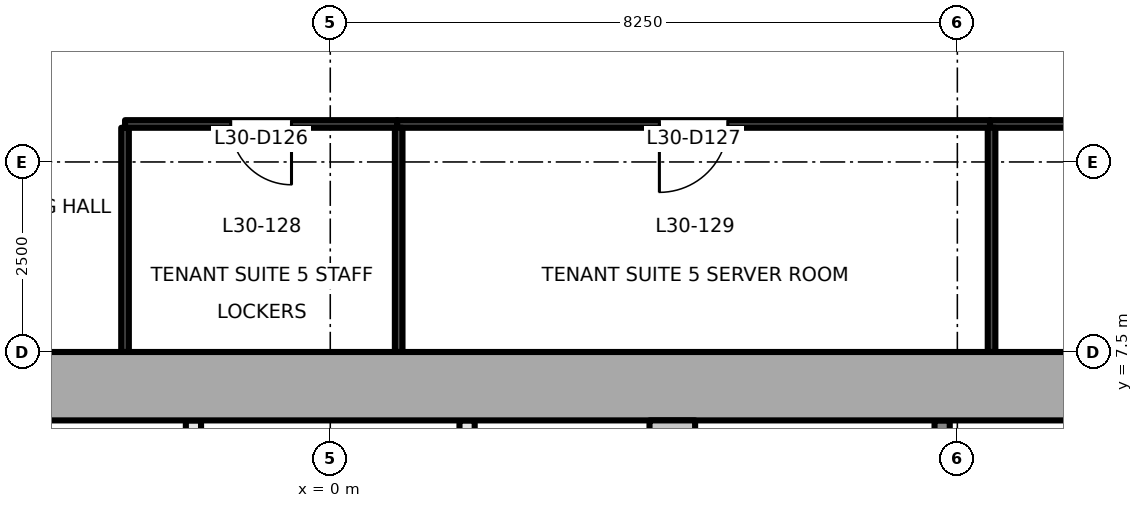
"""IFC4 building model, lengths in metres.
Left out: names, types, materials, properties, quantities, classifications, styles, units other than length and angle.
Written with IfcOpenShell. Run it as: python <this file> out.ifc"""

import sys

from ifc_helpers import new_model, si_unit, direction, frame, frame_2d, origin, place, context, subcontext, project, spatial, rectangle, extrude, element, fill, save


model = new_model("IFC4")
c1 = context("Model", 3, precision=1e-05, world=origin(), true_north=direction((0.0, 1.0)))
c2 = subcontext(c1, "Body", "Model", "MODEL_VIEW")
j1 = project(units=[si_unit("LENGTHUNIT", "METRE"), si_unit("PLANEANGLEUNIT", "RADIAN")], contexts=[c1])
p1 = place(None, origin())
s1 = spatial("IfcSite", under=j1, at=p1, CompositionType="ELEMENT")
p2 = place(p1, origin())
s2 = spatial("IfcBuilding", under=s1, at=p2, CompositionType="ELEMENT")
p3 = place(p2, frame((0.0, 0.0, 134.1)))
s3 = spatial("IfcBuildingStorey", under=s2, at=p3, CompositionType="ELEMENT", Elevation=134.1)
p4 = place(p3, frame((-18.0, 7.05, -0.2), z_axis=(0.0, 0.0, 1.0), x_axis=(1.0, 0.0, 0.0)))
e1 = element("IfcWall", 1, at=p4, inside=s3, PredefinedType="SHEAR", context=c2, shape_type="SweptSolid", body=[
    extrude(rectangle(XDim=36.0, YDim=0.9, at=frame_2d((18.0, 0.0))), origin(), (0.0, 0.0, 1.0), 4.0),
])
p5 = place(p3, frame((4.5, -6.6, -0.2), z_axis=(0.0, 0.0, 1.0), x_axis=(0.0, 1.0, 0.0)))
e2 = element("IfcWall", 2, at=p5, inside=s3, PredefinedType="SHEAR", context=c2, shape_type="SweptSolid", body=[
    extrude(rectangle(XDim=13.2, YDim=0.6, at=frame_2d((6.6, 0.0))), origin(), (0.0, 0.0, 1.0), 4.0),
])
p6 = place(p3, frame((-1.8, -6.6, 0.0), z_axis=(0.0, 0.0, 1.0), x_axis=(0.0, 1.0, 0.0)))
e3 = element("IfcWall", 3, at=p6, inside=s3, PredefinedType="PARTITIONING", context=c2, shape_type="SweptSolid", body=[
    extrude(rectangle(XDim=13.2, YDim=0.2, at=frame_2d((6.6, 0.0))), origin(), (0.0, 0.0, 1.0), 3.8),
])
p7 = place(p6, frame((0.55, 0.0, 0.0)))
e4 = element("IfcOpeningElement", 4, at=p7, cuts=e3, PredefinedType="OPENING", context=c2, shape_type="SweptSolid", body=[
    extrude(rectangle(XDim=0.9, YDim=2.1, at=frame_2d((0.45, 1.05))), frame((0.0, 0.111, 0.0), z_axis=(0.0, -1.0, 0.0), x_axis=(1.0, 0.0, 0.0)), (0.0, 0.0, 1.0), 0.221),
])
p8 = place(p3, frame((1.8, -6.6, 0.0), z_axis=(0.0, 0.0, 1.0), x_axis=(0.0, 1.0, 0.0)))
e5 = element("IfcWall", 5, at=p8, inside=s3, PredefinedType="PARTITIONING", context=c2, shape_type="SweptSolid", body=[
    extrude(rectangle(XDim=13.2, YDim=0.2, at=frame_2d((6.6, 0.0))), origin(), (0.0, 0.0, 1.0), 3.8),
])
p9 = place(p8, frame((0.55, 0.0, 0.0)))
e6 = element("IfcOpeningElement", 6, at=p9, cuts=e5, PredefinedType="OPENING", context=c2, shape_type="SweptSolid", body=[
    extrude(rectangle(XDim=0.9, YDim=2.1, at=frame_2d((0.45, 1.05))), frame((0.0, 0.111, 0.0), z_axis=(0.0, -1.0, 0.0), x_axis=(1.0, 0.0, 0.0)), (0.0, 0.0, 1.0), 0.221),
])
p10 = place(p3, frame((8.05, -6.6, 0.0), z_axis=(0.0, 0.0, 1.0), x_axis=(0.0, 1.0, 0.0)))
e7 = element("IfcWall", 7, at=p10, inside=s3, PredefinedType="PARTITIONING", context=c2, shape_type="SweptSolid", body=[
    extrude(rectangle(XDim=13.2, YDim=0.2, at=frame_2d((6.6, 0.0))), origin(), (0.0, 0.0, 1.0), 3.8),
])
p11 = place(p10, frame((0.298, 0.0, 0.0)))
e8 = element("IfcOpeningElement", 8, at=p11, cuts=e7, PredefinedType="OPENING", context=c2, shape_type="SweptSolid", body=[
    extrude(rectangle(XDim=0.9, YDim=2.1, at=frame_2d((0.45, 1.05))), frame((0.0, 0.111, 0.0), z_axis=(0.0, -1.0, 0.0), x_axis=(1.0, 0.0, 0.0)), (0.0, 0.0, 1.0), 0.221),
])
p12 = place(p10, frame((2.066, 0.0, 0.0)))
e9 = element("IfcOpeningElement", 9, at=p12, cuts=e7, PredefinedType="OPENING", context=c2, shape_type="SweptSolid", body=[
    extrude(rectangle(XDim=0.9, YDim=2.1, at=frame_2d((0.45, 1.05))), frame((0.0, 0.111, 0.0), z_axis=(0.0, -1.0, 0.0), x_axis=(1.0, 0.0, 0.0)), (0.0, 0.0, 1.0), 0.221),
])
p13 = place(p10, frame((3.834, 0.0, 0.0)))
e10 = element("IfcOpeningElement", 10, at=p13, cuts=e7, PredefinedType="OPENING", context=c2, shape_type="SweptSolid", body=[
    extrude(rectangle(XDim=0.9, YDim=2.1, at=frame_2d((0.45, 1.05))), frame((0.0, 0.111, 0.0), z_axis=(0.0, -1.0, 0.0), x_axis=(1.0, 0.0, 0.0)), (0.0, 0.0, 1.0), 0.221),
])
p14 = place(p10, frame((5.466, 0.0, 0.0)))
e11 = element("IfcOpeningElement", 11, at=p14, cuts=e7, PredefinedType="OPENING", context=c2, shape_type="SweptSolid", body=[
    extrude(rectangle(XDim=0.9, YDim=2.1, at=frame_2d((0.45, 1.05))), frame((0.0, 0.111, 0.0), z_axis=(0.0, -1.0, 0.0), x_axis=(1.0, 0.0, 0.0)), (0.0, 0.0, 1.0), 0.221),
])
p15 = place(p10, frame((11.9, 0.0, 0.0)))
e12 = element("IfcOpeningElement", 12, at=p15, cuts=e7, PredefinedType="OPENING", context=c2, shape_type="SweptSolid", body=[
    extrude(rectangle(XDim=1.1, YDim=2.1, at=frame_2d((0.55, 1.05))), frame((0.0, 0.111, 0.0), z_axis=(0.0, -1.0, 0.0), x_axis=(1.0, 0.0, 0.0)), (0.0, 0.0, 1.0), 0.221),
])
p16 = place(p3, frame((-2.7, 10.45, 0.0), z_axis=(0.0, 0.0, 1.0), x_axis=(0.0, -1.0, 0.0)))
e13 = element("IfcWall", 13, at=p16, inside=s3, PredefinedType="PARTITIONING", context=c2, shape_type="SweptSolid", body=[
    extrude(rectangle(XDim=2.95, YDim=0.1, at=frame_2d((1.475, 0.0))), origin(), (0.0, 0.0, 1.0), 3.8),
])
p17 = place(p3, frame((0.88, 10.5, 0.0), z_axis=(0.0, 0.0, 1.0), x_axis=(-1.0, 0.0, 0.0)))
e14 = element("IfcWall", 14, at=p17, inside=s3, PredefinedType="PARTITIONING", context=c2, shape_type="SweptSolid", body=[
    extrude(rectangle(XDim=3.58, YDim=0.1, at=frame_2d((1.79, 0.0))), origin(), (0.0, 0.0, 1.0), 3.5),
])
p18 = place(p17, frame((1.39, 0.0, 0.0)))
e15 = element("IfcOpeningElement", 15, at=p18, cuts=e14, PredefinedType="OPENING", context=c2, shape_type="SweptSolid", body=[
    extrude(rectangle(XDim=0.8, YDim=2.1, at=frame_2d((0.4, 1.05))), frame((0.0, 0.061, 0.0), z_axis=(0.0, -1.0, 0.0), x_axis=(1.0, 0.0, 0.0)), (0.0, 0.0, 1.0), 0.121),
])
p19 = place(p3, frame((8.68, 10.5, 0.0), z_axis=(0.0, 0.0, 1.0), x_axis=(-1.0, 0.0, 0.0)))
e16 = element("IfcWall", 16, at=p19, inside=s3, PredefinedType="PARTITIONING", context=c2, shape_type="SweptSolid", body=[
    extrude(rectangle(XDim=7.8, YDim=0.1, at=frame_2d((3.9, 0.0))), origin(), (0.0, 0.0, 1.0), 3.5),
])
p20 = place(p19, frame((3.45, 0.0, 0.0)))
e17 = element("IfcOpeningElement", 17, at=p20, cuts=e16, PredefinedType="OPENING", context=c2, shape_type="SweptSolid", body=[
    extrude(rectangle(XDim=0.9, YDim=2.1, at=frame_2d((0.45, 1.05))), frame((0.0, 0.061, 0.0), z_axis=(0.0, -1.0, 0.0), x_axis=(1.0, 0.0, 0.0)), (0.0, 0.0, 1.0), 0.121),
])
p21 = place(p3, frame((17.7, 10.5, 0.0), z_axis=(0.0, 0.0, 1.0), x_axis=(-1.0, 0.0, 0.0)))
e18 = element("IfcWall", 18, at=p21, inside=s3, PredefinedType="PARTITIONING", context=c2, shape_type="SweptSolid", body=[
    extrude(rectangle(XDim=9.02, YDim=0.1, at=frame_2d((4.51, 0.0))), origin(), (0.0, 0.0, 1.0), 3.5),
])
p22 = place(p21, frame((2.566, 0.0, 0.0)))
e19 = element("IfcOpeningElement", 19, at=p22, cuts=e18, PredefinedType="OPENING", context=c2, shape_type="SweptSolid", body=[
    extrude(rectangle(XDim=0.8, YDim=2.1, at=frame_2d((0.4, 1.05))), frame((0.0, 0.061, 0.0), z_axis=(0.0, -1.0, 0.0), x_axis=(1.0, 0.0, 0.0)), (0.0, 0.0, 1.0), 0.121),
])
for number, where, z_axis, x_axis in (
    (20, (0.9, 10.45, 0.0), (0.0, 0.0, 1.0), (0.0, -1.0, 0.0)),
    (21, (8.7, 10.45, 0.0), (0.0, 0.0, 1.0), (0.0, -1.0, 0.0)),
):
    element("IfcWall", number, at=place(p3, frame(where, z_axis=z_axis, x_axis=x_axis)), inside=s3, PredefinedType="PARTITIONING", context=c2, shape_type="SweptSolid", body=[
        extrude(rectangle(XDim=2.95, YDim=0.1, at=frame_2d((1.475, 0.0))), origin(), (0.0, 0.0, 1.0), 3.8),
    ])
p23 = place(p18, origin())
e22 = element("IfcDoor", 22, at=p23, inside=s3, OperationType="SINGLE_SWING_LEFT", PredefinedType="DOOR", context=c2, shape_type="SweptSolid", body=[
    extrude(rectangle(XDim=0.8, YDim=2.1, at=frame_2d((0.4, 1.05))), frame((0.0, 0.025, 0.0), z_axis=(0.0, -1.0, 0.0), x_axis=(1.0, 0.0, 0.0)), (0.0, 0.0, 1.0), 0.05),
])
fill(e15, e22)
p24 = place(p20, origin())
e23 = element("IfcDoor", 23, at=p24, inside=s3, OperationType="SINGLE_SWING_RIGHT", PredefinedType="DOOR", context=c2, shape_type="SweptSolid", body=[
    extrude(rectangle(XDim=0.9, YDim=2.1, at=frame_2d((0.45, 1.05))), frame((0.0, 0.025, 0.0), z_axis=(0.0, -1.0, 0.0), x_axis=(1.0, 0.0, 0.0)), (0.0, 0.0, 1.0), 0.05),
])
fill(e17, e23)
save(model, sys.argv[1])
